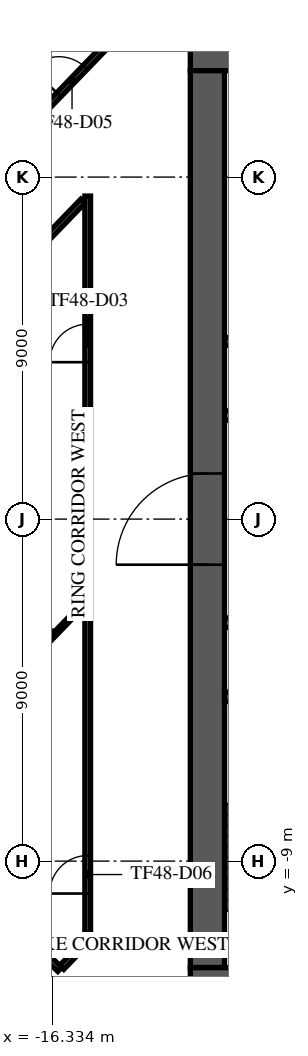
"""IFC4 building model, lengths in metres.
Left out: names, types, materials, properties, quantities, classifications, styles, units other than length and angle.
Written with IfcOpenShell. Run it as: python <this file> out.ifc"""

import sys

from ifc_helpers import new_model, si_unit, direction, frame, frame_2d, origin, place, context, subcontext, project, spatial, rectangle, extrude, element, fill, save


model = new_model("IFC4")
c1 = context("Model", 3, precision=1e-05, world=origin(), true_north=direction((0.0, 1.0)))
c2 = subcontext(c1, "Body", "Model", "MODEL_VIEW")
j1 = project(units=[si_unit("LENGTHUNIT", "METRE"), si_unit("PLANEANGLEUNIT", "RADIAN")], contexts=[c1])
p1 = place(None, origin())
s1 = spatial("IfcSite", under=j1, at=p1, CompositionType="ELEMENT")
p2 = place(p1, origin())
s2 = spatial("IfcBuilding", under=s1, at=p2, CompositionType="ELEMENT")
p3 = place(p2, frame((0.0, 0.0, 205.3)))
s3 = spatial("IfcBuildingStorey", under=s2, at=p3, CompositionType="ELEMENT", Elevation=205.3)
p4 = place(p3, frame((-12.7, 12.25, 0.0), z_axis=(0.0, 0.0, 1.0), x_axis=(1.0, 0.0, 0.0)))
e1 = element("IfcWall", 1, at=p4, inside=s3, PredefinedType="SHEAR", context=c2, shape_type="SweptSolid", body=[
    extrude(rectangle(XDim=25.4, YDim=0.9, at=frame_2d((12.7, 0.0))), origin(), (0.0, 0.0, 1.0), 3.62),
])
p5 = place(p4, frame((11.5, 0.0, 0.0)))
e2 = element("IfcOpeningElement", 2, at=p5, cuts=e1, PredefinedType="OPENING", context=c2, shape_type="SweptSolid", body=[
    extrude(rectangle(XDim=2.4, YDim=2.4, at=frame_2d((1.2, 1.2))), frame((0.0, 0.46, 0.0), z_axis=(0.0, -1.0, 0.0), x_axis=(1.0, 0.0, 0.0)), (0.0, 0.0, 1.0), 0.92),
])
p6 = place(p4, frame((22.325, 0.0, 0.0)))
e3 = element("IfcOpeningElement", 3, at=p6, cuts=e1, PredefinedType="OPENING", context=c2, shape_type="SweptSolid", body=[
    extrude(rectangle(XDim=1.2, YDim=2.1, at=frame_2d((0.6, 1.05))), frame((0.0, 0.46, 0.0), z_axis=(0.0, -1.0, 0.0), x_axis=(1.0, 0.0, 0.0)), (0.0, 0.0, 1.0), 0.92),
])
p7 = place(p4, frame((1.3, 0.0, 0.0)))
e4 = element("IfcOpeningElement", 4, at=p7, cuts=e1, PredefinedType="OPENING", context=c2, shape_type="SweptSolid", body=[
    extrude(rectangle(XDim=1.0, YDim=2.1, at=frame_2d((0.5, 1.05))), frame((0.0, 0.46, 0.0), z_axis=(0.0, -1.0, 0.0), x_axis=(1.0, 0.0, 0.0)), (0.0, 0.0, 1.0), 0.92),
])
p8 = place(p3, frame((-12.7, -12.25, 0.0), z_axis=(0.0, 0.0, 1.0), x_axis=(1.0, 0.0, 0.0)))
e5 = element("IfcWall", 5, at=p8, inside=s3, PredefinedType="SHEAR", context=c2, shape_type="SweptSolid", body=[
    extrude(rectangle(XDim=25.4, YDim=0.9, at=frame_2d((12.7, 0.0))), origin(), (0.0, 0.0, 1.0), 3.62),
])
p9 = place(p8, frame((7.6, 0.0, 0.0)))
e6 = element("IfcOpeningElement", 6, at=p9, cuts=e5, PredefinedType="OPENING", context=c2, shape_type="SweptSolid", body=[
    extrude(rectangle(XDim=2.0, YDim=2.1, at=frame_2d((1.0, 1.05))), frame((0.0, 0.46, 0.0), z_axis=(0.0, -1.0, 0.0), x_axis=(1.0, 0.0, 0.0)), (0.0, 0.0, 1.0), 0.92),
])
p10 = place(p8, frame((17.725, 0.0, 0.0)))
e7 = element("IfcOpeningElement", 7, at=p10, cuts=e5, PredefinedType="OPENING", context=c2, shape_type="SweptSolid", body=[
    extrude(rectangle(XDim=1.2, YDim=2.1, at=frame_2d((0.6, 1.05))), frame((0.0, 0.46, 0.0), z_axis=(0.0, -1.0, 0.0), x_axis=(1.0, 0.0, 0.0)), (0.0, 0.0, 1.0), 0.92),
])
p11 = place(p8, frame((1.875, 0.0, 0.0)))
e8 = element("IfcOpeningElement", 8, at=p11, cuts=e5, PredefinedType="OPENING", context=c2, shape_type="SweptSolid", body=[
    extrude(rectangle(XDim=1.2, YDim=2.1, at=frame_2d((0.6, 1.05))), frame((0.0, 0.46, 0.0), z_axis=(0.0, -1.0, 0.0), x_axis=(1.0, 0.0, 0.0)), (0.0, 0.0, 1.0), 0.92),
])
p12 = place(p8, frame((22.325, 0.0, 0.0)))
e9 = element("IfcOpeningElement", 9, at=p12, cuts=e5, PredefinedType="OPENING", context=c2, shape_type="SweptSolid", body=[
    extrude(rectangle(XDim=1.2, YDim=2.1, at=frame_2d((0.6, 1.05))), frame((0.0, 0.46, 0.0), z_axis=(0.0, -1.0, 0.0), x_axis=(1.0, 0.0, 0.0)), (0.0, 0.0, 1.0), 0.92),
])
p13 = place(p3, frame((-12.25, -11.8, 0.0), z_axis=(0.0, 0.0, 1.0), x_axis=(0.0, 1.0, 0.0)))
e10 = element("IfcWall", 10, at=p13, inside=s3, PredefinedType="SHEAR", context=c2, shape_type="SweptSolid", body=[
    extrude(rectangle(XDim=23.6, YDim=0.9, at=frame_2d((11.8, 0.0))), origin(), (0.0, 0.0, 1.0), 3.62),
])
p14 = place(p13, frame((10.6, 0.0, 0.0)))
e11 = element("IfcOpeningElement", 11, at=p14, cuts=e10, PredefinedType="OPENING", context=c2, shape_type="SweptSolid", body=[
    extrude(rectangle(XDim=2.4, YDim=2.4, at=frame_2d((1.2, 1.2))), frame((0.0, 0.46, 0.0), z_axis=(0.0, -1.0, 0.0), x_axis=(1.0, 0.0, 0.0)), (0.0, 0.0, 1.0), 0.92),
])
p15 = place(p3, frame((-8.65, -4.675, 0.0), z_axis=(0.0, 0.0, 1.0), x_axis=(-1.0, 0.0, 0.0)))
e12 = element("IfcWall", 12, at=p15, inside=s3, PredefinedType="SOLIDWALL", context=c2, shape_type="SweptSolid", body=[
    extrude(rectangle(XDim=3.15, YDim=0.25, at=frame_2d((1.575, 0.0))), origin(), (0.0, 0.0, 1.0), 3.62),
])
p16 = place(p3, frame((-11.795, -2.725, 0.0), z_axis=(0.0, 0.0, 1.0), x_axis=(1.0, 0.0, 0.0)))
e13 = element("IfcWall", 13, at=p16, inside=s3, PredefinedType="PARTITIONING", context=c2, shape_type="SweptSolid", body=[
    extrude(rectangle(XDim=8.915, YDim=0.25, at=frame_2d((4.458, 0.0))), origin(), (0.0, 0.0, 1.0), 3.62),
])
p17 = place(p16, frame((1.295, 0.0, 0.0)))
e14 = element("IfcOpeningElement", 14, at=p17, cuts=e13, PredefinedType="OPENING", context=c2, shape_type="SweptSolid", body=[
    extrude(rectangle(XDim=1.0, YDim=2.1, at=frame_2d((0.5, 1.05))), frame((0.0, 0.135, 0.0), z_axis=(0.0, -1.0, 0.0), x_axis=(1.0, 0.0, 0.0)), (0.0, 0.0, 1.0), 0.27),
])
p18 = place(p16, frame((4.42, 0.0, 0.0)))
e15 = element("IfcOpeningElement", 15, at=p18, cuts=e13, PredefinedType="OPENING", context=c2, shape_type="SweptSolid", body=[
    extrude(rectangle(XDim=1.0, YDim=2.1, at=frame_2d((0.5, 1.05))), frame((0.0, 0.135, 0.0), z_axis=(0.0, -1.0, 0.0), x_axis=(1.0, 0.0, 0.0)), (0.0, 0.0, 1.0), 0.27),
])
p19 = place(p3, frame((-11.795, 2.725, 0.0), z_axis=(0.0, 0.0, 1.0), x_axis=(1.0, 0.0, 0.0)))
e16 = element("IfcWall", 16, at=p19, inside=s3, PredefinedType="PARTITIONING", context=c2, shape_type="SweptSolid", body=[
    extrude(rectangle(XDim=3.415, YDim=0.25, at=frame_2d((1.708, 0.0))), origin(), (0.0, 0.0, 1.0), 3.62),
])
p20 = place(p19, frame((1.345, 0.0, 0.0)))
e17 = element("IfcOpeningElement", 17, at=p20, cuts=e16, PredefinedType="OPENING", context=c2, shape_type="SweptSolid", body=[
    extrude(rectangle(XDim=0.9, YDim=2.1, at=frame_2d((0.45, 1.05))), frame((0.0, 0.135, 0.0), z_axis=(0.0, -1.0, 0.0), x_axis=(1.0, 0.0, 0.0)), (0.0, 0.0, 1.0), 0.27),
])
p21 = place(p3, frame((-11.795, 4.675, 0.0), z_axis=(0.0, 0.0, 1.0), x_axis=(1.0, 0.0, 0.0)))
e18 = element("IfcWall", 18, at=p21, inside=s3, PredefinedType="PARTITIONING", context=c2, shape_type="SweptSolid", body=[
    extrude(rectangle(XDim=3.415, YDim=0.2, at=frame_2d((1.708, 0.0))), origin(), (0.0, 0.0, 1.0), 3.62),
])
p22 = place(p3, frame((-0.749, 34.782, 0.0), z_axis=(0.0, 0.0, 1.0), x_axis=(-0.694657553534, -0.719340589233, 0.0)))
e19 = element("IfcWall", 19, at=p22, inside=s3, PredefinedType="STANDARD", context=c2, shape_type="SweptSolid", body=[
    extrude(rectangle(XDim=49.0, YDim=0.6, at=frame_2d((24.5, 0.0))), origin(), (0.0, 0.0, 1.0), 3.62),
])
p23 = place(p22, frame((1.227, 0.0, 0.9)))
e20 = element("IfcOpeningElement", 20, at=p23, cuts=e19, PredefinedType="OPENING", context=c2, shape_type="SweptSolid", body=[
    extrude(rectangle(XDim=2.0, YDim=2.1, at=frame_2d((1.0, 1.05))), frame((0.0, 0.31, 0.0), z_axis=(0.0, -1.0, 0.0), x_axis=(1.0, 0.0, 0.0)), (0.0, 0.0, 1.0), 0.62),
])
p24 = place(p22, frame((5.682, 0.0, 0.9)))
e21 = element("IfcOpeningElement", 21, at=p24, cuts=e19, PredefinedType="OPENING", context=c2, shape_type="SweptSolid", body=[
    extrude(rectangle(XDim=2.0, YDim=2.1, at=frame_2d((1.0, 1.05))), frame((0.0, 0.31, 0.0), z_axis=(0.0, -1.0, 0.0), x_axis=(1.0, 0.0, 0.0)), (0.0, 0.0, 1.0), 0.62),
])
p25 = place(p22, frame((10.136, 0.0, 0.9)))
e22 = element("IfcOpeningElement", 22, at=p25, cuts=e19, PredefinedType="OPENING", context=c2, shape_type="SweptSolid", body=[
    extrude(rectangle(XDim=2.0, YDim=2.1, at=frame_2d((1.0, 1.05))), frame((0.0, 0.31, 0.0), z_axis=(0.0, -1.0, 0.0), x_axis=(1.0, 0.0, 0.0)), (0.0, 0.0, 1.0), 0.62),
])
p26 = place(p22, frame((14.591, 0.0, 0.9)))
e23 = element("IfcOpeningElement", 23, at=p26, cuts=e19, PredefinedType="OPENING", context=c2, shape_type="SweptSolid", body=[
    extrude(rectangle(XDim=2.0, YDim=2.1, at=frame_2d((1.0, 1.05))), frame((0.0, 0.31, 0.0), z_axis=(0.0, -1.0, 0.0), x_axis=(1.0, 0.0, 0.0)), (0.0, 0.0, 1.0), 0.62),
])
p27 = place(p22, frame((19.045, 0.0, 0.9)))
e24 = element("IfcOpeningElement", 24, at=p27, cuts=e19, PredefinedType="OPENING", context=c2, shape_type="SweptSolid", body=[
    extrude(rectangle(XDim=2.0, YDim=2.1, at=frame_2d((1.0, 1.05))), frame((0.0, 0.31, 0.0), z_axis=(0.0, -1.0, 0.0), x_axis=(1.0, 0.0, 0.0)), (0.0, 0.0, 1.0), 0.62),
])
p28 = place(p22, frame((23.5, 0.0, 0.9)))
e25 = element("IfcOpeningElement", 25, at=p28, cuts=e19, PredefinedType="OPENING", context=c2, shape_type="SweptSolid", body=[
    extrude(rectangle(XDim=2.0, YDim=2.1, at=frame_2d((1.0, 1.05))), frame((0.0, 0.31, 0.0), z_axis=(0.0, -1.0, 0.0), x_axis=(1.0, 0.0, 0.0)), (0.0, 0.0, 1.0), 0.62),
])
p29 = place(p22, frame((27.955, 0.0, 0.9)))
e26 = element("IfcOpeningElement", 26, at=p29, cuts=e19, PredefinedType="OPENING", context=c2, shape_type="SweptSolid", body=[
    extrude(rectangle(XDim=2.0, YDim=2.1, at=frame_2d((1.0, 1.05))), frame((0.0, 0.31, 0.0), z_axis=(0.0, -1.0, 0.0), x_axis=(1.0, 0.0, 0.0)), (0.0, 0.0, 1.0), 0.62),
])
p30 = place(p22, frame((32.409, 0.0, 0.9)))
e27 = element("IfcOpeningElement", 27, at=p30, cuts=e19, PredefinedType="OPENING", context=c2, shape_type="SweptSolid", body=[
    extrude(rectangle(XDim=2.0, YDim=2.1, at=frame_2d((1.0, 1.05))), frame((0.0, 0.31, 0.0), z_axis=(0.0, -1.0, 0.0), x_axis=(1.0, 0.0, 0.0)), (0.0, 0.0, 1.0), 0.62),
])
p31 = place(p22, frame((36.864, 0.0, 0.9)))
e28 = element("IfcOpeningElement", 28, at=p31, cuts=e19, PredefinedType="OPENING", context=c2, shape_type="SweptSolid", body=[
    extrude(rectangle(XDim=2.0, YDim=2.1, at=frame_2d((1.0, 1.05))), frame((0.0, 0.31, 0.0), z_axis=(0.0, -1.0, 0.0), x_axis=(1.0, 0.0, 0.0)), (0.0, 0.0, 1.0), 0.62),
])
p32 = place(p22, frame((41.318, 0.0, 0.9)))
e29 = element("IfcOpeningElement", 29, at=p32, cuts=e19, PredefinedType="OPENING", context=c2, shape_type="SweptSolid", body=[
    extrude(rectangle(XDim=2.0, YDim=2.1, at=frame_2d((1.0, 1.05))), frame((0.0, 0.31, 0.0), z_axis=(0.0, -1.0, 0.0), x_axis=(1.0, 0.0, 0.0)), (0.0, 0.0, 1.0), 0.62),
])
p33 = place(p22, frame((45.773, 0.0, 0.9)))
e30 = element("IfcOpeningElement", 30, at=p33, cuts=e19, PredefinedType="OPENING", context=c2, shape_type="SweptSolid", body=[
    extrude(rectangle(XDim=2.0, YDim=2.1, at=frame_2d((1.0, 1.05))), frame((0.0, 0.31, 0.0), z_axis=(0.0, -1.0, 0.0), x_axis=(1.0, 0.0, 0.0)), (0.0, 0.0, 1.0), 0.62),
])
p34 = place(p3, frame((-34.658, -7.819, 0.0), z_axis=(0.0, 0.0, 1.0), x_axis=(0.719340729741, -0.694657408034, 0.0)))
e31 = element("IfcWall", 31, at=p34, inside=s3, PredefinedType="STANDARD", context=c2, shape_type="SweptSolid", body=[
    extrude(rectangle(XDim=39.0, YDim=0.6, at=frame_2d((19.5, 0.0))), origin(), (0.0, 0.0, 1.0), 3.62),
])
p35 = place(p34, frame((1.217, 0.0, 0.9)))
e32 = element("IfcOpeningElement", 32, at=p35, cuts=e31, PredefinedType="OPENING", context=c2, shape_type="SweptSolid", body=[
    extrude(rectangle(XDim=1.9, YDim=2.1, at=frame_2d((0.95, 1.05))), frame((0.0, 0.31, 0.0), z_axis=(0.0, -1.0, 0.0), x_axis=(1.0, 0.0, 0.0)), (0.0, 0.0, 1.0), 0.62),
])
p36 = place(p34, frame((5.55, 0.0, 0.9)))
e33 = element("IfcOpeningElement", 33, at=p36, cuts=e31, PredefinedType="OPENING", context=c2, shape_type="SweptSolid", body=[
    extrude(rectangle(XDim=1.9, YDim=2.1, at=frame_2d((0.95, 1.05))), frame((0.0, 0.31, 0.0), z_axis=(0.0, -1.0, 0.0), x_axis=(1.0, 0.0, 0.0)), (0.0, 0.0, 1.0), 0.62),
])
p37 = place(p34, frame((9.883, 0.0, 0.9)))
e34 = element("IfcOpeningElement", 34, at=p37, cuts=e31, PredefinedType="OPENING", context=c2, shape_type="SweptSolid", body=[
    extrude(rectangle(XDim=1.9, YDim=2.1, at=frame_2d((0.95, 1.05))), frame((0.0, 0.31, 0.0), z_axis=(0.0, -1.0, 0.0), x_axis=(1.0, 0.0, 0.0)), (0.0, 0.0, 1.0), 0.62),
])
p38 = place(p34, frame((14.217, 0.0, 0.9)))
e35 = element("IfcOpeningElement", 35, at=p38, cuts=e31, PredefinedType="OPENING", context=c2, shape_type="SweptSolid", body=[
    extrude(rectangle(XDim=1.9, YDim=2.1, at=frame_2d((0.95, 1.05))), frame((0.0, 0.31, 0.0), z_axis=(0.0, -1.0, 0.0), x_axis=(1.0, 0.0, 0.0)), (0.0, 0.0, 1.0), 0.62),
])
p39 = place(p34, frame((18.55, 0.0, 0.9)))
e36 = element("IfcOpeningElement", 36, at=p39, cuts=e31, PredefinedType="OPENING", context=c2, shape_type="SweptSolid", body=[
    extrude(rectangle(XDim=1.9, YDim=2.1, at=frame_2d((0.95, 1.05))), frame((0.0, 0.31, 0.0), z_axis=(0.0, -1.0, 0.0), x_axis=(1.0, 0.0, 0.0)), (0.0, 0.0, 1.0), 0.62),
])
p40 = place(p34, frame((22.883, 0.0, 0.9)))
e37 = element("IfcOpeningElement", 37, at=p40, cuts=e31, PredefinedType="OPENING", context=c2, shape_type="SweptSolid", body=[
    extrude(rectangle(XDim=1.9, YDim=2.1, at=frame_2d((0.95, 1.05))), frame((0.0, 0.31, 0.0), z_axis=(0.0, -1.0, 0.0), x_axis=(1.0, 0.0, 0.0)), (0.0, 0.0, 1.0), 0.62),
])
p41 = place(p34, frame((27.217, 0.0, 0.9)))
e38 = element("IfcOpeningElement", 38, at=p41, cuts=e31, PredefinedType="OPENING", context=c2, shape_type="SweptSolid", body=[
    extrude(rectangle(XDim=1.9, YDim=2.1, at=frame_2d((0.95, 1.05))), frame((0.0, 0.31, 0.0), z_axis=(0.0, -1.0, 0.0), x_axis=(1.0, 0.0, 0.0)), (0.0, 0.0, 1.0), 0.62),
])
p42 = place(p34, frame((31.55, 0.0, 0.9)))
e39 = element("IfcOpeningElement", 39, at=p42, cuts=e31, PredefinedType="OPENING", context=c2, shape_type="SweptSolid", body=[
    extrude(rectangle(XDim=1.9, YDim=2.1, at=frame_2d((0.95, 1.05))), frame((0.0, 0.31, 0.0), z_axis=(0.0, -1.0, 0.0), x_axis=(1.0, 0.0, 0.0)), (0.0, 0.0, 1.0), 0.62),
])
p43 = place(p34, frame((35.883, 0.0, 0.9)))
e40 = element("IfcOpeningElement", 40, at=p43, cuts=e31, PredefinedType="OPENING", context=c2, shape_type="SweptSolid", body=[
    extrude(rectangle(XDim=1.9, YDim=2.1, at=frame_2d((0.95, 1.05))), frame((0.0, 0.31, 0.0), z_axis=(0.0, -1.0, 0.0), x_axis=(1.0, 0.0, 0.0)), (0.0, 0.0, 1.0), 0.62),
])
p44 = place(p3, frame((-26.96, -0.016, 0.0), z_axis=(0.0, 0.0, 1.0), x_axis=(0.694654845656, 0.719343204184, 0.0)))
e41 = element("IfcWall", 41, at=p44, inside=s3, PredefinedType="PARTITIONING", context=c2, shape_type="SweptSolid", body=[
    extrude(rectangle(XDim=37.479, YDim=0.15, at=frame_2d((18.74, 0.0))), origin(), (0.0, 0.0, 1.0), 2.97),
])
p45 = place(p44, frame((4.3, 0.0, 0.0)))
e42 = element("IfcOpeningElement", 42, at=p45, cuts=e41, PredefinedType="OPENING", context=c2, shape_type="SweptSolid", body=[
    extrude(rectangle(XDim=1.8, YDim=2.1, at=frame_2d((0.9, 1.05))), frame((0.0, 0.085, 0.0), z_axis=(0.0, -1.0, 0.0), x_axis=(1.0, 0.0, 0.0)), (0.0, 0.0, 1.0), 0.17),
])
p46 = place(p44, frame((15.547, 0.0, 0.0)))
e43 = element("IfcOpeningElement", 43, at=p46, cuts=e41, PredefinedType="OPENING", context=c2, shape_type="SweptSolid", body=[
    extrude(rectangle(XDim=1.0, YDim=2.1, at=frame_2d((0.5, 1.05))), frame((0.0, 0.085, 0.0), z_axis=(0.0, -1.0, 0.0), x_axis=(1.0, 0.0, 0.0)), (0.0, 0.0, 1.0), 0.17),
])
p47 = place(p44, frame((22.58, 0.0, 0.0)))
e44 = element("IfcOpeningElement", 44, at=p47, cuts=e41, PredefinedType="OPENING", context=c2, shape_type="SweptSolid", body=[
    extrude(rectangle(XDim=1.0, YDim=2.1, at=frame_2d((0.5, 1.05))), frame((0.0, 0.085, 0.0), z_axis=(0.0, -1.0, 0.0), x_axis=(1.0, 0.0, 0.0)), (0.0, 0.0, 1.0), 0.17),
])
p48 = place(p44, frame((35.508, 0.0, 0.0)))
e45 = element("IfcOpeningElement", 45, at=p48, cuts=e41, PredefinedType="OPENING", context=c2, shape_type="SweptSolid", body=[
    extrude(rectangle(XDim=1.0, YDim=2.1, at=frame_2d((0.5, 1.05))), frame((0.0, 0.085, 0.0), z_axis=(0.0, -1.0, 0.0), x_axis=(1.0, 0.0, 0.0)), (0.0, 0.0, 1.0), 0.17),
])
p49 = place(p3, frame((-25.182, -1.629, 0.0), z_axis=(0.0, 0.0, 1.0), x_axis=(0.694683242855, 0.719315780514, 0.0)))
e46 = element("IfcWall", 46, at=p49, inside=s3, PredefinedType="PARTITIONING", context=c2, shape_type="SweptSolid", body=[
    extrude(rectangle(XDim=13.896, YDim=0.15, at=frame_2d((6.948, 0.0))), origin(), (0.0, 0.0, 1.0), 3.17),
])
p50 = place(p3, frame((-25.151, -6.479, 0.0), z_axis=(0.0, 0.0, 1.0), x_axis=(0.719341269489, -0.694656849106, 0.0)))
e47 = element("IfcWall", 47, at=p50, inside=s3, PredefinedType="PARTITIONING", context=c2, shape_type="SweptSolid", body=[
    extrude(rectangle(XDim=27.258, YDim=0.15, at=frame_2d((13.629, 0.0))), origin(), (0.0, 0.0, 1.0), 3.17),
])
p51 = place(p50, frame((3.55, 0.0, 0.0)))
e48 = element("IfcOpeningElement", 48, at=p51, cuts=e47, PredefinedType="OPENING", context=c2, shape_type="SweptSolid", body=[
    extrude(rectangle(XDim=1.0, YDim=2.1, at=frame_2d((0.5, 1.05))), frame((0.0, 0.085, 0.0), z_axis=(0.0, -1.0, 0.0), x_axis=(1.0, 0.0, 0.0)), (0.0, 0.0, 1.0), 0.17),
])
p52 = place(p50, frame((10.832, 0.0, 0.0)))
e49 = element("IfcOpeningElement", 49, at=p52, cuts=e47, PredefinedType="OPENING", context=c2, shape_type="SweptSolid", body=[
    extrude(rectangle(XDim=1.0, YDim=2.1, at=frame_2d((0.5, 1.05))), frame((0.0, 0.085, 0.0), z_axis=(0.0, -1.0, 0.0), x_axis=(1.0, 0.0, 0.0)), (0.0, 0.0, 1.0), 0.17),
])
p53 = place(p50, frame((13.797, 0.0, 0.0)))
e50 = element("IfcOpeningElement", 50, at=p53, cuts=e47, PredefinedType="OPENING", context=c2, shape_type="SweptSolid", body=[
    extrude(rectangle(XDim=1.0, YDim=2.1, at=frame_2d((0.5, 1.05))), frame((0.0, 0.085, 0.0), z_axis=(0.0, -1.0, 0.0), x_axis=(1.0, 0.0, 0.0)), (0.0, 0.0, 1.0), 0.17),
])
p54 = place(p3, frame((-23.484, -4.753, 0.0), z_axis=(0.0, 0.0, 1.0), x_axis=(0.719330221059, -0.694668289956, 0.0)))
e51 = element("IfcWall", 51, at=p54, inside=s3, PredefinedType="PARTITIONING", context=c2, shape_type="SweptSolid", body=[
    extrude(rectangle(XDim=10.216, YDim=0.15, at=frame_2d((5.108, 0.0))), origin(), (0.0, 0.0, 1.0), 3.17),
])
p55 = place(p3, frame((-16.083, -11.796, 0.0), z_axis=(0.0, 0.0, 1.0), x_axis=(0.694957895629, 0.719050431682, 0.0)))
e52 = element("IfcWall", 52, at=p55, inside=s3, PredefinedType="PARTITIONING", context=c2, shape_type="SweptSolid", body=[
    extrude(rectangle(XDim=0.983, YDim=0.15, at=frame_2d((0.491, 0.0))), origin(), (0.0, 0.0, 1.0), 3.17),
])
p56 = place(p3, frame((-15.4, -10.903, 0.0), z_axis=(0.0, 0.0, 1.0), x_axis=(0.0, 1.0, 0.0)))
e53 = element("IfcWall", 53, at=p56, inside=s3, PredefinedType="PARTITIONING", context=c2, shape_type="SweptSolid", body=[
    extrude(rectangle(XDim=19.403, YDim=0.15, at=frame_2d((9.702, 0.0))), origin(), (0.0, 0.0, 1.0), 3.17),
])
p57 = place(p56, frame((15.032, 0.0, 0.0)))
e54 = element("IfcOpeningElement", 54, at=p57, cuts=e53, PredefinedType="OPENING", context=c2, shape_type="SweptSolid", body=[
    extrude(rectangle(XDim=1.0, YDim=2.1, at=frame_2d((0.5, 1.05))), frame((0.0, 0.085, 0.0), z_axis=(0.0, -1.0, 0.0), x_axis=(1.0, 0.0, 0.0)), (0.0, 0.0, 1.0), 0.17),
])
p58 = place(p56, frame((1.05, 0.0, 0.0)))
e55 = element("IfcOpeningElement", 55, at=p58, cuts=e53, PredefinedType="OPENING", context=c2, shape_type="SweptSolid", body=[
    extrude(rectangle(XDim=1.0, YDim=2.1, at=frame_2d((0.5, 1.05))), frame((0.0, 0.085, 0.0), z_axis=(0.0, -1.0, 0.0), x_axis=(1.0, 0.0, 0.0)), (0.0, 0.0, 1.0), 0.17),
])
p59 = place(p3, frame((-20.56, -7.472, 0.0), z_axis=(0.0, 0.0, 1.0), x_axis=(0.694721601458, 0.719278733502, 0.0)))
e56 = element("IfcWall", 56, at=p59, inside=s3, PredefinedType="PARTITIONING", context=c2, shape_type="SweptSolid", body=[
    extrude(rectangle(XDim=7.267, YDim=0.1, at=frame_2d((3.634, 0.0))), origin(), (0.0, 0.0, 1.0), 3.17),
])
p60 = place(p14, origin())
e57 = element("IfcDoor", 57, at=p60, inside=s3, OperationType="SINGLE_SWING_LEFT", PredefinedType="DOOR", context=c2, shape_type="SweptSolid", body=[
    extrude(rectangle(XDim=2.4, YDim=2.4, at=frame_2d((1.2, 1.2))), frame((0.0, 0.025, 0.0), z_axis=(0.0, -1.0, 0.0), x_axis=(1.0, 0.0, 0.0)), (0.0, 0.0, 1.0), 0.05),
])
fill(e11, e57)
p61 = place(p57, origin())
e58 = element("IfcDoor", 58, at=p61, inside=s3, OperationType="SINGLE_SWING_RIGHT", PredefinedType="DOOR", context=c2, shape_type="SweptSolid", body=[
    extrude(rectangle(XDim=1.0, YDim=2.1, at=frame_2d((0.5, 1.05))), frame((0.0, 0.025, 0.0), z_axis=(0.0, -1.0, 0.0), x_axis=(1.0, 0.0, 0.0)), (0.0, 0.0, 1.0), 0.05),
])
fill(e54, e58)
p62 = place(p46, origin())
e59 = element("IfcDoor", 59, at=p62, inside=s3, OperationType="SINGLE_SWING_LEFT", PredefinedType="DOOR", context=c2, shape_type="SweptSolid", body=[
    extrude(rectangle(XDim=1.0, YDim=2.1, at=frame_2d((0.5, 1.05))), frame((0.0, 0.025, 0.0), z_axis=(0.0, -1.0, 0.0), x_axis=(1.0, 0.0, 0.0)), (0.0, 0.0, 1.0), 0.05),
])
fill(e43, e59)
p63 = place(p58, origin())
e60 = element("IfcDoor", 60, at=p63, inside=s3, OperationType="SINGLE_SWING_RIGHT", PredefinedType="DOOR", context=c2, shape_type="SweptSolid", body=[
    extrude(rectangle(XDim=1.0, YDim=2.1, at=frame_2d((0.5, 1.05))), frame((0.0, 0.025, 0.0), z_axis=(0.0, -1.0, 0.0), x_axis=(1.0, 0.0, 0.0)), (0.0, 0.0, 1.0), 0.05),
])
fill(e55, e60)
save(model, sys.argv[1])
